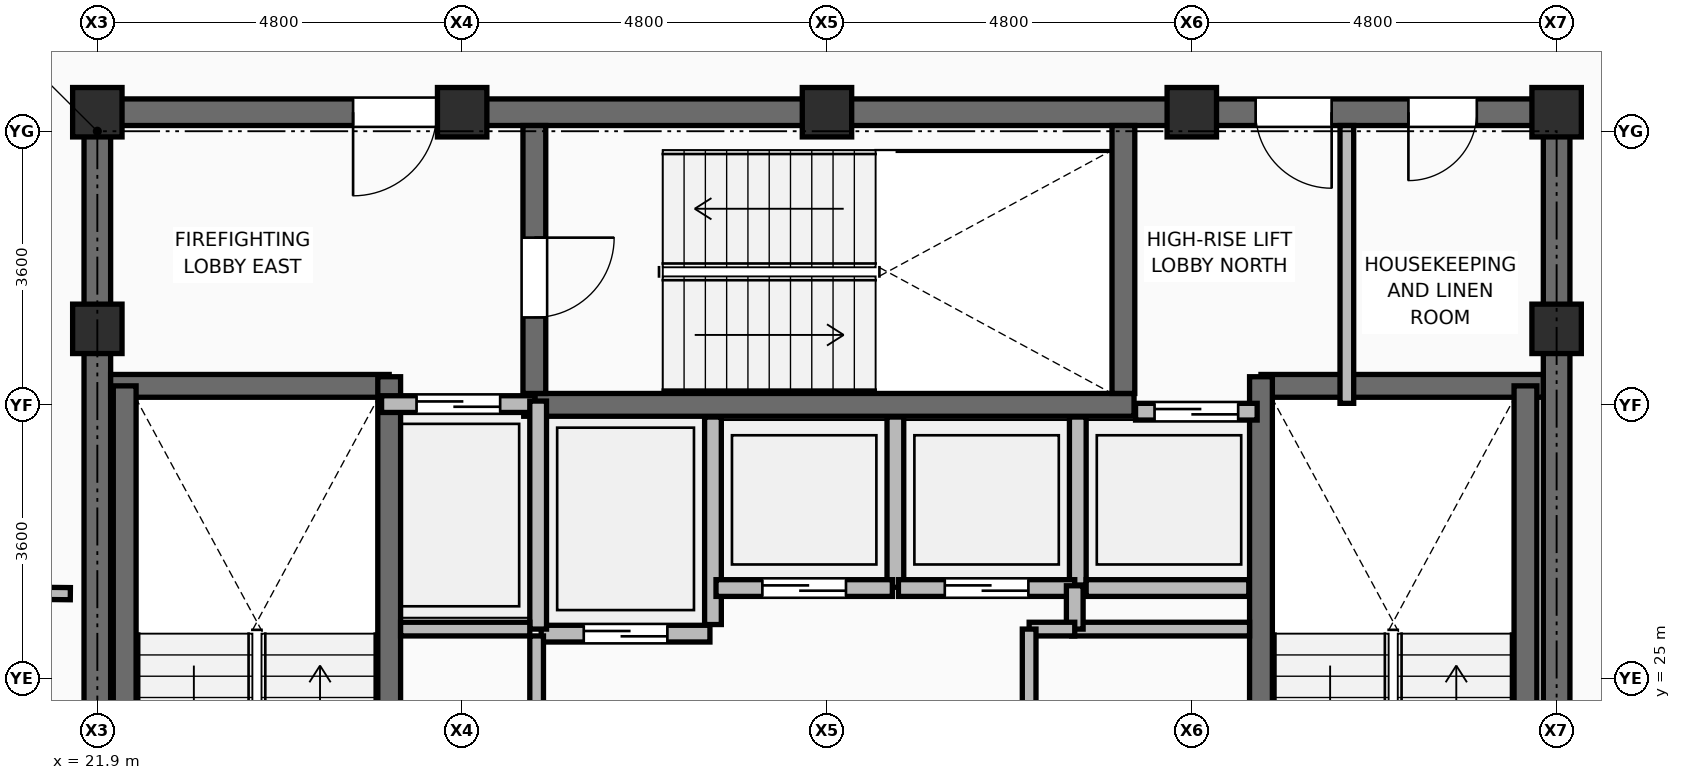
"""IFC4 building model, lengths in metres.
Left out: names, types, materials, properties, quantities, classifications, styles, units other than length and angle.
Written with IfcOpenShell. Run it as: python <this file> out.ifc"""

import sys

from ifc_helpers import new_model, si_unit, direction, frame, frame_2d, origin, origin_2d, place, context, subcontext, project, spatial, rectangle, extrude, element, fill, save


model = new_model("IFC4")
c1 = context("Model", 3, precision=1e-05, world=origin(), true_north=direction((0.0, 1.0)))
c2 = subcontext(c1, "Body", "Model", "MODEL_VIEW")
j1 = project(units=[si_unit("LENGTHUNIT", "METRE"), si_unit("PLANEANGLEUNIT", "RADIAN")], contexts=[c1])
p1 = place(None, origin())
s1 = spatial("IfcSite", under=j1, at=p1, CompositionType="ELEMENT")
p2 = place(p1, origin())
s2 = spatial("IfcBuilding", under=s1, at=p2, CompositionType="ELEMENT")
p3 = place(p2, frame((0.0, 0.0, 271.35)))
s3 = spatial("IfcBuildingStorey", under=s2, at=p3, CompositionType="ELEMENT", Elevation=271.35)
for number, where, z_axis, x_axis in (
    (1, (21.9, 29.6, 0.0), (0.0, 0.0, 1.0), (1.0, 0.0, 0.0)),
    (2, (41.1, 29.6, 0.0), (0.0, 0.0, 1.0), (1.0, 0.0, 0.0)),
    (3, (21.9, 32.45, 0.0), (0.0, 0.0, 1.0), (1.0, 0.0, 0.0)),
    (4, (26.7, 32.45, 0.0), (0.0, 0.0, 1.0), (1.0, 0.0, 0.0)),
    (5, (31.5, 32.45, 0.0), (0.0, 0.0, 1.0), (1.0, 0.0, 0.0)),
    (6, (36.3, 32.45, 0.0), (0.0, 0.0, 1.0), (1.0, 0.0, 0.0)),
    (7, (41.1, 32.45, 0.0), (0.0, 0.0, 1.0), (1.0, 0.0, 0.0)),
):
    element("IfcColumn", number, at=place(p3, frame(where, z_axis=z_axis, x_axis=x_axis)), inside=s3, PredefinedType="COLUMN", context=c2, shape_type="SweptSolid", body=[
        extrude(rectangle(XDim=0.65, YDim=0.65, at=origin_2d()), origin(), (0.0, 0.0, 1.0), 3.75),
    ])
p4 = place(p3, frame((30.0, 25.71, 0.0), z_axis=(0.0, 0.0, 1.0), x_axis=(0.0, 1.0, 0.0)))
e8 = element("IfcWall", 8, at=p4, inside=s3, PredefinedType="PARTITIONING", context=c2, shape_type="SweptSolid", body=[
    extrude(rectangle(XDim=2.73, YDim=0.22, at=frame_2d((1.365, 0.0))), origin(), (0.0, 0.0, 1.0), 3.545),
])
p5 = place(p3, frame((32.4, 26.2, 0.0), z_axis=(0.0, 0.0, 1.0), x_axis=(0.0, 1.0, 0.0)))
e9 = element("IfcWall", 9, at=p5, inside=s3, PredefinedType="PARTITIONING", context=c2, shape_type="SweptSolid", body=[
    extrude(rectangle(XDim=2.24, YDim=0.22, at=frame_2d((1.12, 0.0))), origin(), (0.0, 0.0, 1.0), 3.545),
])
p6 = place(p3, frame((34.8, 26.23, 0.0), z_axis=(0.0, 0.0, 1.0), x_axis=(0.0, 1.0, 0.0)))
e10 = element("IfcWall", 10, at=p6, inside=s3, PredefinedType="PARTITIONING", context=c2, shape_type="SweptSolid", body=[
    extrude(rectangle(XDim=2.21, YDim=0.22, at=frame_2d((1.105, 0.0))), origin(), (0.0, 0.0, 1.0), 3.545),
])
p7 = place(p3, frame((34.91, 26.19, 0.0), z_axis=(0.0, 0.0, 1.0), x_axis=(1.0, 0.0, 0.0)))
e11 = element("IfcWall", 11, at=p7, inside=s3, PredefinedType="PARTITIONING", context=c2, shape_type="SweptSolid", body=[
    extrude(rectangle(XDim=2.14, YDim=0.22, at=frame_2d((1.07, 0.0))), origin(), (0.0, 0.0, 1.0), 3.545),
])
p8 = place(p3, frame((21.725, 32.45, 0.0), z_axis=(0.0, 0.0, 1.0), x_axis=(1.0, 0.0, 0.0)))
e12 = element("IfcWall", 12, at=p8, inside=s3, PredefinedType="SHEAR", context=c2, shape_type="SweptSolid", body=[
    extrude(rectangle(XDim=19.55, YDim=0.35, at=frame_2d((9.775, 0.0))), origin(), (0.0, 0.0, 1.0), 3.57),
])
p9 = place(p8, frame((3.54, 0.0, 0.0)))
e13 = element("IfcOpeningElement", 13, at=p9, cuts=e12, PredefinedType="OPENING", context=c2, shape_type="SweptSolid", body=[
    extrude(rectangle(XDim=1.1, YDim=2.1, at=frame_2d((0.55, 1.05))), frame((0.0, 0.185, 0.0), z_axis=(0.0, -1.0, 0.0), x_axis=(1.0, 0.0, 0.0)), (0.0, 0.0, 1.0), 0.37),
])
p10 = place(p8, frame((15.415, 0.0, 0.0)))
e14 = element("IfcOpeningElement", 14, at=p10, cuts=e12, PredefinedType="OPENING", context=c2, shape_type="SweptSolid", body=[
    extrude(rectangle(XDim=1.0, YDim=2.1, at=frame_2d((0.5, 1.05))), frame((0.0, 0.185, 0.0), z_axis=(0.0, -1.0, 0.0), x_axis=(1.0, 0.0, 0.0)), (0.0, 0.0, 1.0), 0.37),
])
p11 = place(p8, frame((17.425, 0.0, 0.0)))
e15 = element("IfcOpeningElement", 15, at=p11, cuts=e12, PredefinedType="OPENING", context=c2, shape_type="SweptSolid", body=[
    extrude(rectangle(XDim=0.9, YDim=2.1, at=frame_2d((0.45, 1.05))), frame((0.0, 0.185, 0.0), z_axis=(0.0, -1.0, 0.0), x_axis=(1.0, 0.0, 0.0)), (0.0, 0.0, 1.0), 0.37),
])
p12 = place(p3, frame((21.9, 17.975, 0.0), z_axis=(0.0, 0.0, 1.0), x_axis=(0.0, 1.0, 0.0)))
e16 = element("IfcWall", 16, at=p12, inside=s3, PredefinedType="SHEAR", context=c2, shape_type="SweptSolid", body=[
    extrude(rectangle(XDim=14.3, YDim=0.35, at=frame_2d((7.15, 0.0))), origin(), (0.0, 0.0, 1.0), 3.57),
])
p13 = place(p3, frame((41.1, 17.975, 0.0), z_axis=(0.0, 0.0, 1.0), x_axis=(0.0, 1.0, 0.0)))
e17 = element("IfcWall", 17, at=p13, inside=s3, PredefinedType="SHEAR", context=c2, shape_type="SweptSolid", body=[
    extrude(rectangle(XDim=14.3, YDim=0.35, at=frame_2d((7.15, 0.0))), origin(), (0.0, 0.0, 1.0), 3.57),
])
p14 = place(p13, frame((3.485, 0.0, 0.0)))
e18 = element("IfcOpeningElement", 18, at=p14, cuts=e17, PredefinedType="OPENING", context=c2, shape_type="SweptSolid", body=[
    extrude(rectangle(XDim=1.05, YDim=2.1, at=frame_2d((0.525, 1.05))), frame((0.0, 0.185, 0.0), z_axis=(0.0, -1.0, 0.0), x_axis=(1.0, 0.0, 0.0)), (0.0, 0.0, 1.0), 0.37),
])
p15 = place(p3, frame((22.075, 28.85, 0.0), z_axis=(0.0, 0.0, 1.0), x_axis=(1.0, 0.0, 0.0)))
e19 = element("IfcWall", 19, at=p15, inside=s3, PredefinedType="SHEAR", context=c2, shape_type="SweptSolid", body=[
    extrude(rectangle(XDim=3.665, YDim=0.3, at=frame_2d((1.833, 0.0))), origin(), (0.0, 0.0, 1.0), 3.57),
])
p16 = place(p3, frame((25.74, 20.98, 0.0), z_axis=(0.0, 0.0, 1.0), x_axis=(0.0, 1.0, 0.0)))
e20 = element("IfcWall", 20, at=p16, inside=s3, PredefinedType="SHEAR", context=c2, shape_type="SweptSolid", body=[
    extrude(rectangle(XDim=7.99, YDim=0.3, at=frame_2d((3.995, 0.0))), origin(), (0.0, 0.0, 1.0), 3.57),
])
p17 = place(p3, frame((22.26, 21.1, 0.0), z_axis=(0.0, 0.0, 1.0), x_axis=(0.0, 1.0, 0.0)))
e21 = element("IfcWall", 21, at=p17, inside=s3, PredefinedType="SHEAR", context=c2, shape_type="SweptSolid", body=[
    extrude(rectangle(XDim=7.75, YDim=0.3, at=frame_2d((3.875, 0.0))), origin(), (0.0, 0.0, 1.0), 3.57),
])
p18 = place(p3, frame((37.21, 28.85, 0.0), z_axis=(0.0, 0.0, 1.0), x_axis=(1.0, 0.0, 0.0)))
e22 = element("IfcWall", 22, at=p18, inside=s3, PredefinedType="SHEAR", context=c2, shape_type="SweptSolid", body=[
    extrude(rectangle(XDim=3.715, YDim=0.3, at=frame_2d((1.857, 0.0))), origin(), (0.0, 0.0, 1.0), 3.57),
])
p19 = place(p3, frame((37.21, 20.98, 0.0), z_axis=(0.0, 0.0, 1.0), x_axis=(0.0, 1.0, 0.0)))
e23 = element("IfcWall", 23, at=p19, inside=s3, PredefinedType="SHEAR", context=c2, shape_type="SweptSolid", body=[
    extrude(rectangle(XDim=7.99, YDim=0.3, at=frame_2d((3.995, 0.0))), origin(), (0.0, 0.0, 1.0), 3.57),
])
p20 = place(p3, frame((40.69, 22.65, 0.0), z_axis=(0.0, 0.0, 1.0), x_axis=(0.0, 1.0, 0.0)))
e24 = element("IfcWall", 24, at=p20, inside=s3, PredefinedType="SHEAR", context=c2, shape_type="SweptSolid", body=[
    extrude(rectangle(XDim=6.2, YDim=0.3, at=frame_2d((3.1, 0.0))), origin(), (0.0, 0.0, 1.0), 3.57),
])
p21 = place(p3, frame((27.51, 28.6, 0.0), z_axis=(0.0, 0.0, 1.0), x_axis=(1.0, 0.0, 0.0)))
e25 = element("IfcWall", 25, at=p21, inside=s3, PredefinedType="SHEAR", context=c2, shape_type="SweptSolid", body=[
    extrude(rectangle(XDim=8.03, YDim=0.3, at=frame_2d((4.015, 0.0))), origin(), (0.0, 0.0, 1.0), 3.57),
])
p22 = place(p3, frame((27.65, 28.75, 0.0), z_axis=(0.0, 0.0, 1.0), x_axis=(0.0, 1.0, 0.0)))
e26 = element("IfcWall", 26, at=p22, inside=s3, PredefinedType="SHEAR", context=c2, shape_type="SweptSolid", body=[
    extrude(rectangle(XDim=3.525, YDim=0.3, at=frame_2d((1.762, 0.0))), origin(), (0.0, 0.0, 1.0), 3.57),
])
p23 = place(p22, frame((1.0, 0.0, 0.0)))
e27 = element("IfcOpeningElement", 27, at=p23, cuts=e26, PredefinedType="OPENING", context=c2, shape_type="SweptSolid", body=[
    extrude(rectangle(XDim=1.05, YDim=2.1, at=frame_2d((0.525, 1.05))), frame((0.0, 0.16, 0.0), z_axis=(0.0, -1.0, 0.0), x_axis=(1.0, 0.0, 0.0)), (0.0, 0.0, 1.0), 0.32),
])
p24 = place(p3, frame((35.4, 28.75, 0.0), z_axis=(0.0, 0.0, 1.0), x_axis=(0.0, 1.0, 0.0)))
e28 = element("IfcWall", 28, at=p24, inside=s3, PredefinedType="SHEAR", context=c2, shape_type="SweptSolid", body=[
    extrude(rectangle(XDim=3.525, YDim=0.3, at=frame_2d((1.762, 0.0))), origin(), (0.0, 0.0, 1.0), 3.57),
])
p25 = place(p3, frame((25.64, 28.61, 0.0), z_axis=(0.0, 0.0, 1.0), x_axis=(1.0, 0.0, 0.0)))
e29 = element("IfcWall", 29, at=p25, inside=s3, PredefinedType="PARTITIONING", context=c2, shape_type="SweptSolid", body=[
    extrude(rectangle(XDim=2.02, YDim=0.22, at=frame_2d((1.01, 0.0))), origin(), (0.0, 0.0, 1.0), 3.55),
])
p26 = place(p25, frame((0.46, 0.0, 0.0)))
e30 = element("IfcOpeningElement", 30, at=p26, cuts=e29, PredefinedType="OPENING", context=c2, shape_type="SweptSolid", body=[
    extrude(rectangle(XDim=1.1, YDim=2.2, at=frame_2d((0.55, 1.1))), frame((0.0, 0.12, 0.0), z_axis=(0.0, -1.0, 0.0), x_axis=(1.0, 0.0, 0.0)), (0.0, 0.0, 1.0), 0.24),
])
p27 = place(p3, frame((27.74, 25.59, 0.0), z_axis=(0.0, 0.0, 1.0), x_axis=(1.0, 0.0, 0.0)))
e31 = element("IfcWall", 31, at=p27, inside=s3, PredefinedType="PARTITIONING", context=c2, shape_type="SweptSolid", body=[
    extrude(rectangle(XDim=2.22, YDim=0.22, at=frame_2d((1.11, 0.0))), origin(), (0.0, 0.0, 1.0), 3.55),
])
p28 = place(p27, frame((0.56, 0.0, 0.0)))
e32 = element("IfcOpeningElement", 32, at=p28, cuts=e31, PredefinedType="OPENING", context=c2, shape_type="SweptSolid", body=[
    extrude(rectangle(XDim=1.1, YDim=2.2, at=frame_2d((0.55, 1.1))), frame((0.0, 0.12, 0.0), z_axis=(0.0, -1.0, 0.0), x_axis=(1.0, 0.0, 0.0)), (0.0, 0.0, 1.0), 0.24),
])
p29 = place(p3, frame((30.04, 26.19, 0.0), z_axis=(0.0, 0.0, 1.0), x_axis=(1.0, 0.0, 0.0)))
e33 = element("IfcWall", 33, at=p29, inside=s3, PredefinedType="PARTITIONING", context=c2, shape_type="SweptSolid", body=[
    extrude(rectangle(XDim=2.32, YDim=0.22, at=frame_2d((1.16, 0.0))), origin(), (0.0, 0.0, 1.0), 3.55),
])
p30 = place(p29, frame((0.61, 0.0, 0.0)))
e34 = element("IfcOpeningElement", 34, at=p30, cuts=e33, PredefinedType="OPENING", context=c2, shape_type="SweptSolid", body=[
    extrude(rectangle(XDim=1.1, YDim=2.2, at=frame_2d((0.55, 1.1))), frame((0.0, 0.12, 0.0), z_axis=(0.0, -1.0, 0.0), x_axis=(1.0, 0.0, 0.0)), (0.0, 0.0, 1.0), 0.24),
])
p31 = place(p3, frame((32.44, 26.19, 0.0), z_axis=(0.0, 0.0, 1.0), x_axis=(1.0, 0.0, 0.0)))
e35 = element("IfcWall", 35, at=p31, inside=s3, PredefinedType="PARTITIONING", context=c2, shape_type="SweptSolid", body=[
    extrude(rectangle(XDim=2.32, YDim=0.22, at=frame_2d((1.16, 0.0))), origin(), (0.0, 0.0, 1.0), 3.55),
])
p32 = place(p31, frame((0.61, 0.0, 0.0)))
e36 = element("IfcOpeningElement", 36, at=p32, cuts=e35, PredefinedType="OPENING", context=c2, shape_type="SweptSolid", body=[
    extrude(rectangle(XDim=1.1, YDim=2.2, at=frame_2d((0.55, 1.1))), frame((0.0, 0.12, 0.0), z_axis=(0.0, -1.0, 0.0), x_axis=(1.0, 0.0, 0.0)), (0.0, 0.0, 1.0), 0.24),
])
p33 = place(p3, frame((35.56, 28.51, 0.0), z_axis=(0.0, 0.0, 1.0), x_axis=(1.0, 0.0, 0.0)))
e37 = element("IfcWall", 37, at=p33, inside=s3, PredefinedType="PARTITIONING", context=c2, shape_type="SweptSolid", body=[
    extrude(rectangle(XDim=1.6, YDim=0.22, at=frame_2d((0.8, 0.0))), origin(), (0.0, 0.0, 1.0), 3.55),
])
p34 = place(p33, frame((0.25, 0.0, 0.0)))
e38 = element("IfcOpeningElement", 38, at=p34, cuts=e37, PredefinedType="OPENING", context=c2, shape_type="SweptSolid", body=[
    extrude(rectangle(XDim=1.1, YDim=2.2, at=frame_2d((0.55, 1.1))), frame((0.0, 0.12, 0.0), z_axis=(0.0, -1.0, 0.0), x_axis=(1.0, 0.0, 0.0)), (0.0, 0.0, 1.0), 0.24),
])
p35 = place(p3, frame((27.7, 25.65, 0.0), z_axis=(0.0, 0.0, 1.0), x_axis=(0.0, 1.0, 0.0)))
e39 = element("IfcWall", 39, at=p35, inside=s3, PredefinedType="PARTITIONING", context=c2, shape_type="SweptSolid", body=[
    extrude(rectangle(XDim=3.0, YDim=0.22, at=frame_2d((1.5, 0.0))), origin(), (0.0, 0.0, 1.0), 3.55),
])
p36 = place(p3, frame((25.89, 25.65, 0.0), z_axis=(0.0, 0.0, 1.0), x_axis=(1.0, 0.0, 0.0)))
e40 = element("IfcWall", 40, at=p36, inside=s3, PredefinedType="PARTITIONING", context=c2, shape_type="SweptSolid", body=[
    extrude(rectangle(XDim=1.7, YDim=0.18, at=frame_2d((0.85, 0.0))), origin(), (0.0, 0.0, 1.0), 3.55),
])
p37 = place(p3, frame((27.68, 24.16, 0.0), z_axis=(0.0, 0.0, 1.0), x_axis=(0.0, 1.0, 0.0)))
e41 = element("IfcWall", 41, at=p37, inside=s3, PredefinedType="PARTITIONING", context=c2, shape_type="SweptSolid", body=[
    extrude(rectangle(XDim=1.4, YDim=0.18, at=frame_2d((0.7, 0.0))), origin(), (0.0, 0.0, 1.0), 3.55),
])
p38 = place(p3, frame((34.72, 25.65, 0.0), z_axis=(0.0, 0.0, 1.0), x_axis=(1.0, 0.0, 0.0)))
e42 = element("IfcWall", 42, at=p38, inside=s3, PredefinedType="PARTITIONING", context=c2, shape_type="SweptSolid", body=[
    extrude(rectangle(XDim=2.34, YDim=0.18, at=frame_2d((1.17, 0.0))), origin(), (0.0, 0.0, 1.0), 3.55),
])
p39 = place(p3, frame((34.76, 25.65, 0.0), z_axis=(0.0, 0.0, 1.0), x_axis=(0.0, 1.0, 0.0)))
e43 = element("IfcWall", 43, at=p39, inside=s3, PredefinedType="PARTITIONING", context=c2, shape_type="SweptSolid", body=[
    extrude(rectangle(XDim=0.57, YDim=0.22, at=frame_2d((0.285, 0.0))), origin(), (0.0, 0.0, 1.0), 3.55),
])
p40 = place(p3, frame((34.16, 25.65, 0.0), z_axis=(0.0, 0.0, 1.0), x_axis=(1.0, 0.0, 0.0)))
e44 = element("IfcWall", 44, at=p40, inside=s3, PredefinedType="PARTITIONING", context=c2, shape_type="SweptSolid", body=[
    extrude(rectangle(XDim=0.6, YDim=0.18, at=frame_2d((0.3, 0.0))), origin(), (0.0, 0.0, 1.0), 3.55),
])
p41 = place(p3, frame((34.16, 21.1, 0.0), z_axis=(0.0, 0.0, 1.0), x_axis=(0.0, 1.0, 0.0)))
e45 = element("IfcWall", 45, at=p41, inside=s3, PredefinedType="PARTITIONING", context=c2, shape_type="SweptSolid", body=[
    extrude(rectangle(XDim=4.55, YDim=0.18, at=frame_2d((2.275, 0.0))), origin(), (0.0, 0.0, 1.0), 3.55),
])
p42 = place(p41, frame((1.825, 0.0, 0.0)))
e46 = element("IfcOpeningElement", 46, at=p42, cuts=e45, PredefinedType="OPENING", context=c2, shape_type="SweptSolid", body=[
    extrude(rectangle(XDim=0.9, YDim=2.1, at=frame_2d((0.45, 1.05))), frame((0.0, 0.1, 0.0), z_axis=(0.0, -1.0, 0.0), x_axis=(1.0, 0.0, 0.0)), (0.0, 0.0, 1.0), 0.2),
])
p43 = place(p3, frame((38.34, 28.62, 0.0), z_axis=(0.0, 0.0, 1.0), x_axis=(0.0, 1.0, 0.0)))
e47 = element("IfcWall", 47, at=p43, inside=s3, PredefinedType="PARTITIONING", context=c2, shape_type="SweptSolid", body=[
    extrude(rectangle(XDim=3.655, YDim=0.18, at=frame_2d((1.827, 0.0))), origin(), (0.0, 0.0, 1.0), 3.132),
])
p44 = place(p3, frame((21.545, 26.116, 0.0), z_axis=(0.0, 0.0, 1.0), x_axis=(-0.999947421001, 0.010254522592, 0.0)))
e48 = element("IfcWall", 48, at=p44, inside=s3, PredefinedType="PARTITIONING", context=c2, shape_type="SweptSolid", body=[
    extrude(rectangle(XDim=1.857, YDim=0.16, at=frame_2d((0.928, 0.0))), origin(), (0.0, 0.0, 1.0), 2.595),
])
p45 = place(p3, frame((20.404, 32.698, 0.0), z_axis=(0.0, 0.0, 1.0), x_axis=(0.753965421059, 0.656914106902, 0.0)))
e49 = element("IfcWall", 49, at=p45, inside=s3, PredefinedType="PARTITIONING", context=c2, shape_type="SweptSolid", body=[
    extrude(rectangle(XDim=2.317, YDim=0.16, at=frame_2d((1.158, 0.0))), origin(), (0.0, 0.0, 1.0), 3.132),
])
p46 = place(p23, frame((1.05, 0.0, 0.0), z_axis=(0.0, 0.0, 1.0), x_axis=(-1.0, 0.0, 0.0)))
e50 = element("IfcDoor", 50, at=p46, inside=s3, OperationType="SINGLE_SWING_LEFT", PredefinedType="DOOR", context=c2, shape_type="SweptSolid", body=[
    extrude(rectangle(XDim=1.05, YDim=2.1, at=frame_2d((0.525, 1.05))), frame((0.0, 0.025, 0.0), z_axis=(0.0, -1.0, 0.0), x_axis=(1.0, 0.0, 0.0)), (0.0, 0.0, 1.0), 0.05),
])
fill(e27, e50)
p47 = place(p26, origin())
e51 = element("IfcDoor", 51, at=p47, inside=s3, OperationType="DOUBLE_DOOR_SLIDING", PredefinedType="DOOR", context=c2, shape_type="SweptSolid", body=[
    extrude(rectangle(XDim=1.1, YDim=2.2, at=frame_2d((0.55, 1.1))), frame((0.0, 0.025, 0.0), z_axis=(0.0, -1.0, 0.0), x_axis=(1.0, 0.0, 0.0)), (0.0, 0.0, 1.0), 0.05),
])
fill(e30, e51)
p48 = place(p28, frame((1.1, 0.0, 0.0), z_axis=(0.0, 0.0, 1.0), x_axis=(-1.0, 0.0, 0.0)))
e52 = element("IfcDoor", 52, at=p48, inside=s3, OperationType="DOUBLE_DOOR_SLIDING", PredefinedType="DOOR", context=c2, shape_type="SweptSolid", body=[
    extrude(rectangle(XDim=1.1, YDim=2.2, at=frame_2d((0.55, 1.1))), frame((0.0, 0.025, 0.0), z_axis=(0.0, -1.0, 0.0), x_axis=(1.0, 0.0, 0.0)), (0.0, 0.0, 1.0), 0.05),
])
fill(e32, e52)
p49 = place(p30, frame((1.1, 0.0, 0.0), z_axis=(0.0, 0.0, 1.0), x_axis=(-1.0, 0.0, 0.0)))
e53 = element("IfcDoor", 53, at=p49, inside=s3, OperationType="DOUBLE_DOOR_SLIDING", PredefinedType="DOOR", context=c2, shape_type="SweptSolid", body=[
    extrude(rectangle(XDim=1.1, YDim=2.2, at=frame_2d((0.55, 1.1))), frame((0.0, 0.025, 0.0), z_axis=(0.0, -1.0, 0.0), x_axis=(1.0, 0.0, 0.0)), (0.0, 0.0, 1.0), 0.05),
])
fill(e34, e53)
p50 = place(p32, frame((1.1, 0.0, 0.0), z_axis=(0.0, 0.0, 1.0), x_axis=(-1.0, 0.0, 0.0)))
e54 = element("IfcDoor", 54, at=p50, inside=s3, OperationType="DOUBLE_DOOR_SLIDING", PredefinedType="DOOR", context=c2, shape_type="SweptSolid", body=[
    extrude(rectangle(XDim=1.1, YDim=2.2, at=frame_2d((0.55, 1.1))), frame((0.0, 0.025, 0.0), z_axis=(0.0, -1.0, 0.0), x_axis=(1.0, 0.0, 0.0)), (0.0, 0.0, 1.0), 0.05),
])
fill(e36, e54)
p51 = place(p34, origin())
e55 = element("IfcDoor", 55, at=p51, inside=s3, OperationType="DOUBLE_DOOR_SLIDING", PredefinedType="DOOR", context=c2, shape_type="SweptSolid", body=[
    extrude(rectangle(XDim=1.1, YDim=2.2, at=frame_2d((0.55, 1.1))), frame((0.0, 0.025, 0.0), z_axis=(0.0, -1.0, 0.0), x_axis=(1.0, 0.0, 0.0)), (0.0, 0.0, 1.0), 0.05),
])
fill(e38, e55)
p52 = place(p9, frame((1.1, 0.0, 0.0), z_axis=(0.0, 0.0, 1.0), x_axis=(-1.0, 0.0, 0.0)))
e56 = element("IfcDoor", 56, at=p52, inside=s3, OperationType="SINGLE_SWING_RIGHT", PredefinedType="DOOR", context=c2, shape_type="SweptSolid", body=[
    extrude(rectangle(XDim=1.1, YDim=2.1, at=frame_2d((0.55, 1.05))), frame((0.0, 0.025, 0.0), z_axis=(0.0, -1.0, 0.0), x_axis=(1.0, 0.0, 0.0)), (0.0, 0.0, 1.0), 0.05),
])
fill(e13, e56)
p53 = place(p10, frame((1.0, 0.0, 0.0), z_axis=(0.0, 0.0, 1.0), x_axis=(-1.0, 0.0, 0.0)))
e57 = element("IfcDoor", 57, at=p53, inside=s3, OperationType="SINGLE_SWING_LEFT", PredefinedType="DOOR", context=c2, shape_type="SweptSolid", body=[
    extrude(rectangle(XDim=1.0, YDim=2.1, at=frame_2d((0.5, 1.05))), frame((0.0, 0.025, 0.0), z_axis=(0.0, -1.0, 0.0), x_axis=(1.0, 0.0, 0.0)), (0.0, 0.0, 1.0), 0.05),
])
fill(e14, e57)
p54 = place(p11, frame((0.9, 0.0, 0.0), z_axis=(0.0, 0.0, 1.0), x_axis=(-1.0, 0.0, 0.0)))
e58 = element("IfcDoor", 58, at=p54, inside=s3, OperationType="SINGLE_SWING_RIGHT", PredefinedType="DOOR", context=c2, shape_type="SweptSolid", body=[
    extrude(rectangle(XDim=0.9, YDim=2.1, at=frame_2d((0.45, 1.05))), frame((0.0, 0.025, 0.0), z_axis=(0.0, -1.0, 0.0), x_axis=(1.0, 0.0, 0.0)), (0.0, 0.0, 1.0), 0.05),
])
fill(e15, e58)
save(model, sys.argv[1])
